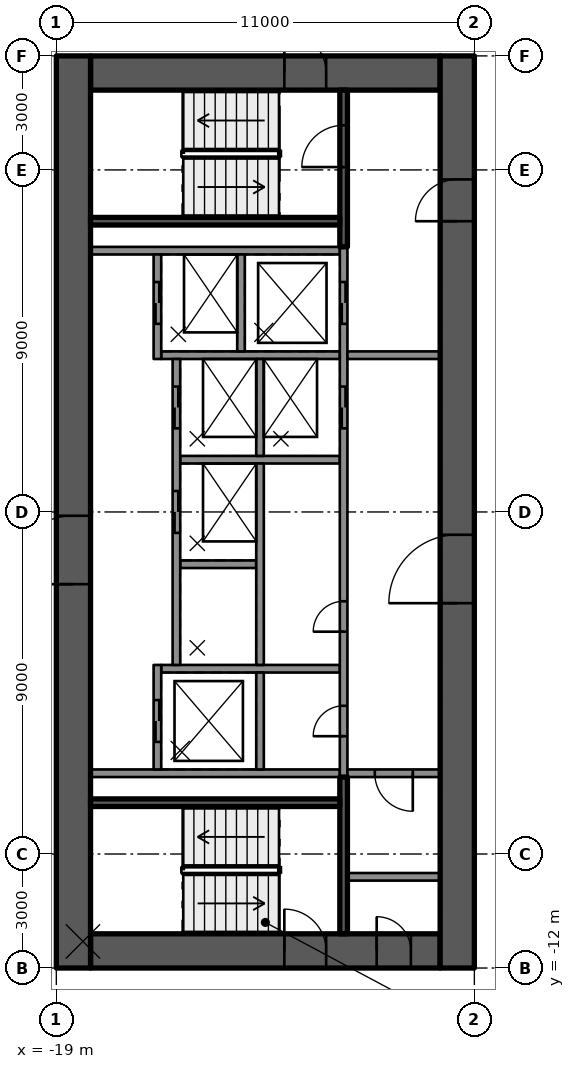
"""IFC4 building model, lengths in metres.
Left out: names, types, materials, properties, quantities, classifications, styles, units other than length and angle.
Written with IfcOpenShell. Run it as: python <this file> out.ifc"""

import sys

from ifc_helpers import new_model, si_unit, direction, frame, frame_2d, origin, place, context, subcontext, project, spatial, rectangle, extrude, element, fill, save


model = new_model("IFC4")
c1 = context("Model", 3, precision=1e-05, world=origin(), true_north=direction((0.0, 1.0)))
c2 = subcontext(c1, "Body", "Model", "MODEL_VIEW")
j1 = project(units=[si_unit("LENGTHUNIT", "METRE"), si_unit("PLANEANGLEUNIT", "RADIAN")], contexts=[c1])
p1 = place(None, origin())
s1 = spatial("IfcSite", under=j1, at=p1, CompositionType="ELEMENT")
p2 = place(p1, origin())
s2 = spatial("IfcBuilding", under=s1, at=p2, CompositionType="ELEMENT")
p3 = place(p2, frame((0.0, 0.0, 167.1)))
s3 = spatial("IfcBuildingStorey", under=s2, at=p3, CompositionType="ELEMENT", Elevation=167.1)
p4 = place(p3, frame((-18.1, 11.55, 0.0), z_axis=(0.0, 0.0, 1.0), x_axis=(1.0, 0.0, 0.0)))
e1 = element("IfcWall", 1, at=p4, inside=s3, PredefinedType="SHEAR", context=c2, shape_type="SweptSolid", body=[
    extrude(rectangle(XDim=9.2, YDim=0.9, at=frame_2d((4.6, 0.0))), origin(), (0.0, 0.0, 1.0), 3.5),
])
p5 = place(p4, frame((5.1, 0.0, 0.0)))
e2 = element("IfcOpeningElement", 2, at=p5, cuts=e1, PredefinedType="OPENING", context=c2, shape_type="SweptSolid", body=[
    extrude(rectangle(XDim=1.1, YDim=2.1, at=frame_2d((0.55, 1.05))), frame((0.0, 0.46, 0.0), z_axis=(0.0, -1.0, 0.0), x_axis=(1.0, 0.0, 0.0)), (0.0, 0.0, 1.0), 0.92),
])
p6 = place(p3, frame((-18.1, -11.55, 0.0), z_axis=(0.0, 0.0, 1.0), x_axis=(1.0, 0.0, 0.0)))
e3 = element("IfcWall", 3, at=p6, inside=s3, PredefinedType="SHEAR", context=c2, shape_type="SweptSolid", body=[
    extrude(rectangle(XDim=9.2, YDim=0.9, at=frame_2d((4.6, 0.0))), origin(), (0.0, 0.0, 1.0), 3.5),
])
p7 = place(p6, frame((5.1, 0.0, 0.0)))
e4 = element("IfcOpeningElement", 4, at=p7, cuts=e3, PredefinedType="OPENING", context=c2, shape_type="SweptSolid", body=[
    extrude(rectangle(XDim=1.1, YDim=2.1, at=frame_2d((0.55, 1.05))), frame((0.0, 0.46, 0.0), z_axis=(0.0, -1.0, 0.0), x_axis=(1.0, 0.0, 0.0)), (0.0, 0.0, 1.0), 0.92),
])
p8 = place(p6, frame((7.53, 0.0, 0.0)))
e5 = element("IfcOpeningElement", 5, at=p8, cuts=e3, PredefinedType="OPENING", context=c2, shape_type="SweptSolid", body=[
    extrude(rectangle(XDim=0.9, YDim=2.1, at=frame_2d((0.45, 1.05))), frame((0.0, 0.46, 0.0), z_axis=(0.0, -1.0, 0.0), x_axis=(1.0, 0.0, 0.0)), (0.0, 0.0, 1.0), 0.92),
])
p9 = place(p3, frame((-18.55, -12.0, 0.0), z_axis=(0.0, 0.0, 1.0), x_axis=(0.0, 1.0, 0.0)))
e6 = element("IfcWall", 6, at=p9, inside=s3, PredefinedType="SHEAR", context=c2, shape_type="SweptSolid", body=[
    extrude(rectangle(XDim=24.0, YDim=0.9, at=frame_2d((12.0, 0.0))), origin(), (0.0, 0.0, 1.0), 3.5),
])
p10 = place(p9, frame((10.1, 0.0, 0.0)))
e7 = element("IfcOpeningElement", 7, at=p10, cuts=e6, PredefinedType="OPENING", context=c2, shape_type="SweptSolid", body=[
    extrude(rectangle(XDim=1.8, YDim=2.1, at=frame_2d((0.9, 1.05))), frame((0.0, 0.46, 0.0), z_axis=(0.0, -1.0, 0.0), x_axis=(1.0, 0.0, 0.0)), (0.0, 0.0, 1.0), 0.92),
])
p11 = place(p3, frame((-8.45, -12.0, 0.0), z_axis=(0.0, 0.0, 1.0), x_axis=(0.0, 1.0, 0.0)))
e8 = element("IfcWall", 8, at=p11, inside=s3, PredefinedType="SHEAR", context=c2, shape_type="SweptSolid", body=[
    extrude(rectangle(XDim=24.0, YDim=0.9, at=frame_2d((12.0, 0.0))), origin(), (0.0, 0.0, 1.0), 3.5),
])
p12 = place(p11, frame((9.6, 0.0, 0.0)))
e9 = element("IfcOpeningElement", 9, at=p12, cuts=e8, PredefinedType="OPENING", context=c2, shape_type="SweptSolid", body=[
    extrude(rectangle(XDim=1.8, YDim=2.1, at=frame_2d((0.9, 1.05))), frame((0.0, 0.46, 0.0), z_axis=(0.0, -1.0, 0.0), x_axis=(1.0, 0.0, 0.0)), (0.0, 0.0, 1.0), 0.92),
])
p13 = place(p11, frame((19.65, 0.0, 0.0)))
e10 = element("IfcOpeningElement", 10, at=p13, cuts=e8, PredefinedType="OPENING", context=c2, shape_type="SweptSolid", body=[
    extrude(rectangle(XDim=1.1, YDim=2.1, at=frame_2d((0.55, 1.05))), frame((0.0, 0.46, 0.0), z_axis=(0.0, -1.0, 0.0), x_axis=(1.0, 0.0, 0.0)), (0.0, 0.0, 1.0), 0.92),
])
for number, where, z_axis, x_axis in (
    (11, (-11.54, 6.875, 0.0), (0.0, 0.0, 1.0), (-1.0, 0.0, 0.0)),
    (12, (-11.54, -6.875, 0.0), (0.0, 0.0, 1.0), (-1.0, 0.0, 0.0)),
):
    element("IfcWall", number, at=place(p3, frame(where, z_axis=z_axis, x_axis=x_axis)), inside=s3, PredefinedType="SOLIDWALL", context=c2, shape_type="SweptSolid", body=[
        extrude(rectangle(XDim=6.56, YDim=0.2, at=frame_2d((3.28, 0.0))), origin(), (0.0, 0.0, 1.0), 3.08),
    ])
p14 = place(p3, frame((-11.54, -4.125, 0.0), z_axis=(0.0, 0.0, 1.0), x_axis=(-1.0, 0.0, 0.0)))
e13 = element("IfcWall", 13, at=p14, inside=s3, PredefinedType="SOLIDWALL", context=c2, shape_type="SweptSolid", body=[
    extrude(rectangle(XDim=4.7, YDim=0.2, at=frame_2d((2.35, 0.0))), origin(), (0.0, 0.0, 1.0), 3.08),
])
p15 = place(p3, frame((-13.74, -1.375, 0.0), z_axis=(0.0, 0.0, 1.0), x_axis=(-1.0, 0.0, 0.0)))
e14 = element("IfcWall", 14, at=p15, inside=s3, PredefinedType="SOLIDWALL", context=c2, shape_type="SweptSolid", body=[
    extrude(rectangle(XDim=2.0, YDim=0.2, at=frame_2d((1.0, 0.0))), origin(), (0.0, 0.0, 1.0), 3.08),
])
p16 = place(p3, frame((-11.54, 1.375, 0.0), z_axis=(0.0, 0.0, 1.0), x_axis=(-1.0, 0.0, 0.0)))
e15 = element("IfcWall", 15, at=p16, inside=s3, PredefinedType="SOLIDWALL", context=c2, shape_type="SweptSolid", body=[
    extrude(rectangle(XDim=4.2, YDim=0.2, at=frame_2d((2.1, 0.0))), origin(), (0.0, 0.0, 1.0), 3.08),
])
p17 = place(p3, frame((-11.54, 4.125, 0.0), z_axis=(0.0, 0.0, 1.0), x_axis=(-1.0, 0.0, 0.0)))
e16 = element("IfcWall", 16, at=p17, inside=s3, PredefinedType="SOLIDWALL", context=c2, shape_type="SweptSolid", body=[
    extrude(rectangle(XDim=4.7, YDim=0.2, at=frame_2d((2.35, 0.0))), origin(), (0.0, 0.0, 1.0), 3.08),
])
p18 = place(p3, frame((-11.44, -6.975, 0.0), z_axis=(0.0, 0.0, 1.0), x_axis=(0.0, 1.0, 0.0)))
e17 = element("IfcWall", 17, at=p18, inside=s3, PredefinedType="SOLIDWALL", context=c2, shape_type="SweptSolid", body=[
    extrude(rectangle(XDim=13.95, YDim=0.2, at=frame_2d((6.975, 0.0))), origin(), (0.0, 0.0, 1.0), 3.08),
])
p19 = place(p18, frame((9.175, 0.0, 0.0)))
e18 = element("IfcOpeningElement", 18, at=p19, cuts=e17, PredefinedType="OPENING", context=c2, shape_type="SweptSolid", body=[
    extrude(rectangle(XDim=1.1, YDim=2.1, at=frame_2d((0.55, 1.05))), frame((0.0, 0.11, 0.0), z_axis=(0.0, -1.0, 0.0), x_axis=(1.0, 0.0, 0.0)), (0.0, 0.0, 1.0), 0.22),
])
p20 = place(p18, frame((11.925, 0.0, 0.0)))
e19 = element("IfcOpeningElement", 19, at=p20, cuts=e17, PredefinedType="OPENING", context=c2, shape_type="SweptSolid", body=[
    extrude(rectangle(XDim=1.1, YDim=2.1, at=frame_2d((0.55, 1.05))), frame((0.0, 0.11, 0.0), z_axis=(0.0, -1.0, 0.0), x_axis=(1.0, 0.0, 0.0)), (0.0, 0.0, 1.0), 0.22),
])
p21 = place(p18, frame((1.075, 0.0, 0.0)))
e20 = element("IfcOpeningElement", 20, at=p21, cuts=e17, PredefinedType="OPENING", context=c2, shape_type="SweptSolid", body=[
    extrude(rectangle(XDim=0.8, YDim=2.1, at=frame_2d((0.4, 1.05))), frame((0.0, 0.11, 0.0), z_axis=(0.0, -1.0, 0.0), x_axis=(1.0, 0.0, 0.0)), (0.0, 0.0, 1.0), 0.22),
])
p22 = place(p18, frame((3.825, 0.0, 0.0)))
e21 = element("IfcOpeningElement", 21, at=p22, cuts=e17, PredefinedType="OPENING", context=c2, shape_type="SweptSolid", body=[
    extrude(rectangle(XDim=0.8, YDim=2.1, at=frame_2d((0.4, 1.05))), frame((0.0, 0.11, 0.0), z_axis=(0.0, -1.0, 0.0), x_axis=(1.0, 0.0, 0.0)), (0.0, 0.0, 1.0), 0.22),
])
p23 = place(p3, frame((-13.64, -6.775, 0.0), z_axis=(0.0, 0.0, 1.0), x_axis=(0.0, 1.0, 0.0)))
e22 = element("IfcWall", 22, at=p23, inside=s3, PredefinedType="SOLIDWALL", context=c2, shape_type="SweptSolid", body=[
    extrude(rectangle(XDim=2.55, YDim=0.2, at=frame_2d((1.275, 0.0))), origin(), (0.0, 0.0, 1.0), 3.08),
])
p24 = place(p3, frame((-13.64, -4.025, 0.0), z_axis=(0.0, 0.0, 1.0), x_axis=(0.0, 1.0, 0.0)))
e23 = element("IfcWall", 23, at=p24, inside=s3, PredefinedType="SOLIDWALL", context=c2, shape_type="SweptSolid", body=[
    extrude(rectangle(XDim=5.3, YDim=0.2, at=frame_2d((2.65, 0.0))), origin(), (0.0, 0.0, 1.0), 3.08),
])
for number, where, z_axis, x_axis in (
    (24, (-13.64, 1.475, 0.0), (0.0, 0.0, 1.0), (0.0, 1.0, 0.0)),
    (25, (-14.14, 4.225, 0.0), (0.0, 0.0, 1.0), (0.0, 1.0, 0.0)),
):
    element("IfcWall", number, at=place(p3, frame(where, z_axis=z_axis, x_axis=x_axis)), inside=s3, PredefinedType="SOLIDWALL", context=c2, shape_type="SweptSolid", body=[
        extrude(rectangle(XDim=2.55, YDim=0.2, at=frame_2d((1.275, 0.0))), origin(), (0.0, 0.0, 1.0), 3.08),
    ])
p25 = place(p3, frame((-16.34, -6.775, 0.0), z_axis=(0.0, 0.0, 1.0), x_axis=(0.0, 1.0, 0.0)))
e26 = element("IfcWall", 26, at=p25, inside=s3, PredefinedType="SOLIDWALL", context=c2, shape_type="SweptSolid", body=[
    extrude(rectangle(XDim=2.75, YDim=0.2, at=frame_2d((1.375, 0.0))), origin(), (0.0, 0.0, 1.0), 3.08),
])
p26 = place(p25, frame((0.725, 0.0, 0.0)))
e27 = element("IfcOpeningElement", 27, at=p26, cuts=e26, PredefinedType="OPENING", context=c2, shape_type="SweptSolid", body=[
    extrude(rectangle(XDim=1.1, YDim=2.1, at=frame_2d((0.55, 1.05))), frame((0.0, 0.11, 0.0), z_axis=(0.0, -1.0, 0.0), x_axis=(1.0, 0.0, 0.0)), (0.0, 0.0, 1.0), 0.22),
])
p27 = place(p3, frame((-15.84, -4.025, 0.0), z_axis=(0.0, 0.0, 1.0), x_axis=(0.0, 1.0, 0.0)))
e28 = element("IfcWall", 28, at=p27, inside=s3, PredefinedType="SOLIDWALL", context=c2, shape_type="SweptSolid", body=[
    extrude(rectangle(XDim=8.05, YDim=0.2, at=frame_2d((4.025, 0.0))), origin(), (0.0, 0.0, 1.0), 3.08),
])
p28 = place(p27, frame((3.475, 0.0, 0.0)))
e29 = element("IfcOpeningElement", 29, at=p28, cuts=e28, PredefinedType="OPENING", context=c2, shape_type="SweptSolid", body=[
    extrude(rectangle(XDim=1.1, YDim=2.1, at=frame_2d((0.55, 1.05))), frame((0.0, 0.11, 0.0), z_axis=(0.0, -1.0, 0.0), x_axis=(1.0, 0.0, 0.0)), (0.0, 0.0, 1.0), 0.22),
])
p29 = place(p27, frame((6.225, 0.0, 0.0)))
e30 = element("IfcOpeningElement", 30, at=p29, cuts=e28, PredefinedType="OPENING", context=c2, shape_type="SweptSolid", body=[
    extrude(rectangle(XDim=1.1, YDim=2.1, at=frame_2d((0.55, 1.05))), frame((0.0, 0.11, 0.0), z_axis=(0.0, -1.0, 0.0), x_axis=(1.0, 0.0, 0.0)), (0.0, 0.0, 1.0), 0.22),
])
p30 = place(p3, frame((-16.34, 4.025, 0.0), z_axis=(0.0, 0.0, 1.0), x_axis=(0.0, 1.0, 0.0)))
e31 = element("IfcWall", 31, at=p30, inside=s3, PredefinedType="SOLIDWALL", context=c2, shape_type="SweptSolid", body=[
    extrude(rectangle(XDim=2.75, YDim=0.2, at=frame_2d((1.375, 0.0))), origin(), (0.0, 0.0, 1.0), 3.08),
])
p31 = place(p30, frame((0.925, 0.0, 0.0)))
e32 = element("IfcOpeningElement", 32, at=p31, cuts=e31, PredefinedType="OPENING", context=c2, shape_type="SweptSolid", body=[
    extrude(rectangle(XDim=1.1, YDim=2.1, at=frame_2d((0.55, 1.05))), frame((0.0, 0.11, 0.0), z_axis=(0.0, -1.0, 0.0), x_axis=(1.0, 0.0, 0.0)), (0.0, 0.0, 1.0), 0.22),
])
p32 = place(p3, frame((-11.44, 6.975, 0.0), z_axis=(0.0, 0.0, 1.0), x_axis=(0.0, 1.0, 0.0)))
e33 = element("IfcWall", 33, at=p32, inside=s3, PredefinedType="SOLIDWALL", context=c2, shape_type="SweptSolid", body=[
    extrude(rectangle(XDim=4.125, YDim=0.2, at=frame_2d((2.062, 0.0))), origin(), (0.0, 0.0, 1.0), 3.08),
])
p33 = place(p32, frame((2.1, 0.0, 0.0)))
e34 = element("IfcOpeningElement", 34, at=p33, cuts=e33, PredefinedType="OPENING", context=c2, shape_type="SweptSolid", body=[
    extrude(rectangle(XDim=1.1, YDim=2.1, at=frame_2d((0.55, 1.05))), frame((0.0, 0.11, 0.0), z_axis=(0.0, -1.0, 0.0), x_axis=(1.0, 0.0, 0.0)), (0.0, 0.0, 1.0), 0.22),
])
p34 = place(p3, frame((-11.54, 7.65, 0.0), z_axis=(0.0, 0.0, 1.0), x_axis=(-1.0, 0.0, 0.0)))
e35 = element("IfcWall", 35, at=p34, inside=s3, PredefinedType="SOLIDWALL", context=c2, shape_type="SweptSolid", body=[
    extrude(rectangle(XDim=6.56, YDim=0.2, at=frame_2d((3.28, 0.0))), origin(), (0.0, 0.0, 1.0), 3.08),
])
p35 = place(p3, frame((-11.44, -11.1, 0.0), z_axis=(0.0, 0.0, 1.0), x_axis=(0.0, 1.0, 0.0)))
e36 = element("IfcWall", 36, at=p35, inside=s3, PredefinedType="SOLIDWALL", context=c2, shape_type="SweptSolid", body=[
    extrude(rectangle(XDim=4.125, YDim=0.2, at=frame_2d((2.062, 0.0))), origin(), (0.0, 0.0, 1.0), 3.08),
])
p36 = place(p3, frame((-11.54, -7.65, 0.0), z_axis=(0.0, 0.0, 1.0), x_axis=(-1.0, 0.0, 0.0)))
e37 = element("IfcWall", 37, at=p36, inside=s3, PredefinedType="SOLIDWALL", context=c2, shape_type="SweptSolid", body=[
    extrude(rectangle(XDim=6.56, YDim=0.2, at=frame_2d((3.28, 0.0))), origin(), (0.0, 0.0, 1.0), 3.08),
])
p37 = place(p3, frame((-8.9, 4.125, 0.0), z_axis=(0.0, 0.0, 1.0), x_axis=(-1.0, 0.0, 0.0)))
e38 = element("IfcWall", 38, at=p37, inside=s3, PredefinedType="PARTITIONING", context=c2, shape_type="SweptSolid", body=[
    extrude(rectangle(XDim=2.44, YDim=0.2, at=frame_2d((1.22, 0.0))), origin(), (0.0, 0.0, 1.0), 3.08),
])
p38 = place(p3, frame((-8.9, -6.875, 0.0), z_axis=(0.0, 0.0, 1.0), x_axis=(-1.0, 0.0, 0.0)))
e39 = element("IfcWall", 39, at=p38, inside=s3, PredefinedType="PARTITIONING", context=c2, shape_type="SweptSolid", body=[
    extrude(rectangle(XDim=2.44, YDim=0.2, at=frame_2d((1.22, 0.0))), origin(), (0.0, 0.0, 1.0), 3.08),
])
p39 = place(p38, frame((0.72, 0.0, 0.0)))
e40 = element("IfcOpeningElement", 40, at=p39, cuts=e39, PredefinedType="OPENING", context=c2, shape_type="SweptSolid", body=[
    extrude(rectangle(XDim=1.0, YDim=2.1, at=frame_2d((0.5, 1.05))), frame((0.0, 0.11, 0.0), z_axis=(0.0, -1.0, 0.0), x_axis=(1.0, 0.0, 0.0)), (0.0, 0.0, 1.0), 0.22),
])
p40 = place(p3, frame((-8.9, -9.6, 0.0), z_axis=(0.0, 0.0, 1.0), x_axis=(-1.0, 0.0, 0.0)))
e41 = element("IfcWall", 41, at=p40, inside=s3, PredefinedType="PARTITIONING", context=c2, shape_type="SweptSolid", body=[
    extrude(rectangle(XDim=2.44, YDim=0.2, at=frame_2d((1.22, 0.0))), origin(), (0.0, 0.0, 1.0), 3.08),
])
p41 = place(p26, origin())
e42 = element("IfcDoor", 42, at=p41, inside=s3, OperationType="DOUBLE_DOOR_SLIDING", PredefinedType="DOOR", context=c2, shape_type="SweptSolid", body=[
    extrude(rectangle(XDim=1.1, YDim=2.1, at=frame_2d((0.55, 1.05))), frame((0.0, 0.025, 0.0), z_axis=(0.0, -1.0, 0.0), x_axis=(1.0, 0.0, 0.0)), (0.0, 0.0, 1.0), 0.05),
])
fill(e27, e42)
p42 = place(p28, origin())
e43 = element("IfcDoor", 43, at=p42, inside=s3, OperationType="DOUBLE_DOOR_SLIDING", PredefinedType="DOOR", context=c2, shape_type="SweptSolid", body=[
    extrude(rectangle(XDim=1.1, YDim=2.1, at=frame_2d((0.55, 1.05))), frame((0.0, 0.025, 0.0), z_axis=(0.0, -1.0, 0.0), x_axis=(1.0, 0.0, 0.0)), (0.0, 0.0, 1.0), 0.05),
])
fill(e29, e43)
p43 = place(p19, origin())
e44 = element("IfcDoor", 44, at=p43, inside=s3, OperationType="DOUBLE_DOOR_SLIDING", PredefinedType="DOOR", context=c2, shape_type="SweptSolid", body=[
    extrude(rectangle(XDim=1.1, YDim=2.1, at=frame_2d((0.55, 1.05))), frame((0.0, 0.025, 0.0), z_axis=(0.0, -1.0, 0.0), x_axis=(1.0, 0.0, 0.0)), (0.0, 0.0, 1.0), 0.05),
])
fill(e18, e44)
p44 = place(p29, origin())
e45 = element("IfcDoor", 45, at=p44, inside=s3, OperationType="DOUBLE_DOOR_SLIDING", PredefinedType="DOOR", context=c2, shape_type="SweptSolid", body=[
    extrude(rectangle(XDim=1.1, YDim=2.1, at=frame_2d((0.55, 1.05))), frame((0.0, 0.025, 0.0), z_axis=(0.0, -1.0, 0.0), x_axis=(1.0, 0.0, 0.0)), (0.0, 0.0, 1.0), 0.05),
])
fill(e30, e45)
p45 = place(p20, origin())
e46 = element("IfcDoor", 46, at=p45, inside=s3, OperationType="DOUBLE_DOOR_SLIDING", PredefinedType="DOOR", context=c2, shape_type="SweptSolid", body=[
    extrude(rectangle(XDim=1.1, YDim=2.1, at=frame_2d((0.55, 1.05))), frame((0.0, 0.025, 0.0), z_axis=(0.0, -1.0, 0.0), x_axis=(1.0, 0.0, 0.0)), (0.0, 0.0, 1.0), 0.05),
])
fill(e19, e46)
p46 = place(p31, origin())
e47 = element("IfcDoor", 47, at=p46, inside=s3, OperationType="DOUBLE_DOOR_SLIDING", PredefinedType="DOOR", context=c2, shape_type="SweptSolid", body=[
    extrude(rectangle(XDim=1.1, YDim=2.1, at=frame_2d((0.55, 1.05))), frame((0.0, 0.025, 0.0), z_axis=(0.0, -1.0, 0.0), x_axis=(1.0, 0.0, 0.0)), (0.0, 0.0, 1.0), 0.05),
])
fill(e32, e47)
p47 = place(p21, origin())
e48 = element("IfcDoor", 48, at=p47, inside=s3, OperationType="SINGLE_SWING_LEFT", PredefinedType="DOOR", context=c2, shape_type="SweptSolid", body=[
    extrude(rectangle(XDim=0.8, YDim=2.1, at=frame_2d((0.4, 1.05))), frame((0.0, 0.025, 0.0), z_axis=(0.0, -1.0, 0.0), x_axis=(1.0, 0.0, 0.0)), (0.0, 0.0, 1.0), 0.05),
])
fill(e20, e48)
p48 = place(p22, origin())
e49 = element("IfcDoor", 49, at=p48, inside=s3, OperationType="SINGLE_SWING_LEFT", PredefinedType="DOOR", context=c2, shape_type="SweptSolid", body=[
    extrude(rectangle(XDim=0.8, YDim=2.1, at=frame_2d((0.4, 1.05))), frame((0.0, 0.025, 0.0), z_axis=(0.0, -1.0, 0.0), x_axis=(1.0, 0.0, 0.0)), (0.0, 0.0, 1.0), 0.05),
])
fill(e21, e49)
p49 = place(p12, origin())
e50 = element("IfcDoor", 50, at=p49, inside=s3, OperationType="SINGLE_SWING_LEFT", PredefinedType="DOOR", context=c2, shape_type="SweptSolid", body=[
    extrude(rectangle(XDim=1.8, YDim=2.1, at=frame_2d((0.9, 1.05))), frame((0.0, 0.025, 0.0), z_axis=(0.0, -1.0, 0.0), x_axis=(1.0, 0.0, 0.0)), (0.0, 0.0, 1.0), 0.05),
])
fill(e9, e50)
p50 = place(p10, origin())
e51 = element("IfcDoor", 51, at=p50, inside=s3, OperationType="SINGLE_SWING_LEFT", PredefinedType="DOOR", context=c2, shape_type="SweptSolid", body=[
    extrude(rectangle(XDim=1.8, YDim=2.1, at=frame_2d((0.9, 1.05))), frame((0.0, 0.025, 0.0), z_axis=(0.0, -1.0, 0.0), x_axis=(1.0, 0.0, 0.0)), (0.0, 0.0, 1.0), 0.05),
])
fill(e7, e51)
p51 = place(p13, origin())
e52 = element("IfcDoor", 52, at=p51, inside=s3, OperationType="SINGLE_SWING_RIGHT", PredefinedType="DOOR", context=c2, shape_type="SweptSolid", body=[
    extrude(rectangle(XDim=1.1, YDim=2.1, at=frame_2d((0.55, 1.05))), frame((0.0, 0.025, 0.0), z_axis=(0.0, -1.0, 0.0), x_axis=(1.0, 0.0, 0.0)), (0.0, 0.0, 1.0), 0.05),
])
fill(e10, e52)
p52 = place(p5, origin())
e53 = element("IfcDoor", 53, at=p52, inside=s3, OperationType="SINGLE_SWING_RIGHT", PredefinedType="DOOR", context=c2, shape_type="SweptSolid", body=[
    extrude(rectangle(XDim=1.1, YDim=2.1, at=frame_2d((0.55, 1.05))), frame((0.0, 0.025, 0.0), z_axis=(0.0, -1.0, 0.0), x_axis=(1.0, 0.0, 0.0)), (0.0, 0.0, 1.0), 0.05),
])
fill(e2, e53)
p53 = place(p7, origin())
e54 = element("IfcDoor", 54, at=p53, inside=s3, OperationType="SINGLE_SWING_RIGHT", PredefinedType="DOOR", context=c2, shape_type="SweptSolid", body=[
    extrude(rectangle(XDim=1.1, YDim=2.1, at=frame_2d((0.55, 1.05))), frame((0.0, 0.025, 0.0), z_axis=(0.0, -1.0, 0.0), x_axis=(1.0, 0.0, 0.0)), (0.0, 0.0, 1.0), 0.05),
])
fill(e4, e54)
p54 = place(p33, origin())
e55 = element("IfcDoor", 55, at=p54, inside=s3, OperationType="SINGLE_SWING_RIGHT", PredefinedType="DOOR", context=c2, shape_type="SweptSolid", body=[
    extrude(rectangle(XDim=1.1, YDim=2.1, at=frame_2d((0.55, 1.05))), frame((0.0, 0.025, 0.0), z_axis=(0.0, -1.0, 0.0), x_axis=(1.0, 0.0, 0.0)), (0.0, 0.0, 1.0), 0.05),
])
fill(e34, e55)
p55 = place(p8, origin())
e56 = element("IfcDoor", 56, at=p55, inside=s3, OperationType="SINGLE_SWING_RIGHT", PredefinedType="DOOR", context=c2, shape_type="SweptSolid", body=[
    extrude(rectangle(XDim=0.9, YDim=2.1, at=frame_2d((0.45, 1.05))), frame((0.0, 0.025, 0.0), z_axis=(0.0, -1.0, 0.0), x_axis=(1.0, 0.0, 0.0)), (0.0, 0.0, 1.0), 0.05),
])
fill(e5, e56)
p56 = place(p39, origin())
e57 = element("IfcDoor", 57, at=p56, inside=s3, OperationType="SINGLE_SWING_RIGHT", PredefinedType="DOOR", context=c2, shape_type="SweptSolid", body=[
    extrude(rectangle(XDim=1.0, YDim=2.1, at=frame_2d((0.5, 1.05))), frame((0.0, 0.025, 0.0), z_axis=(0.0, -1.0, 0.0), x_axis=(1.0, 0.0, 0.0)), (0.0, 0.0, 1.0), 0.05),
])
fill(e40, e57)
save(model, sys.argv[1])
